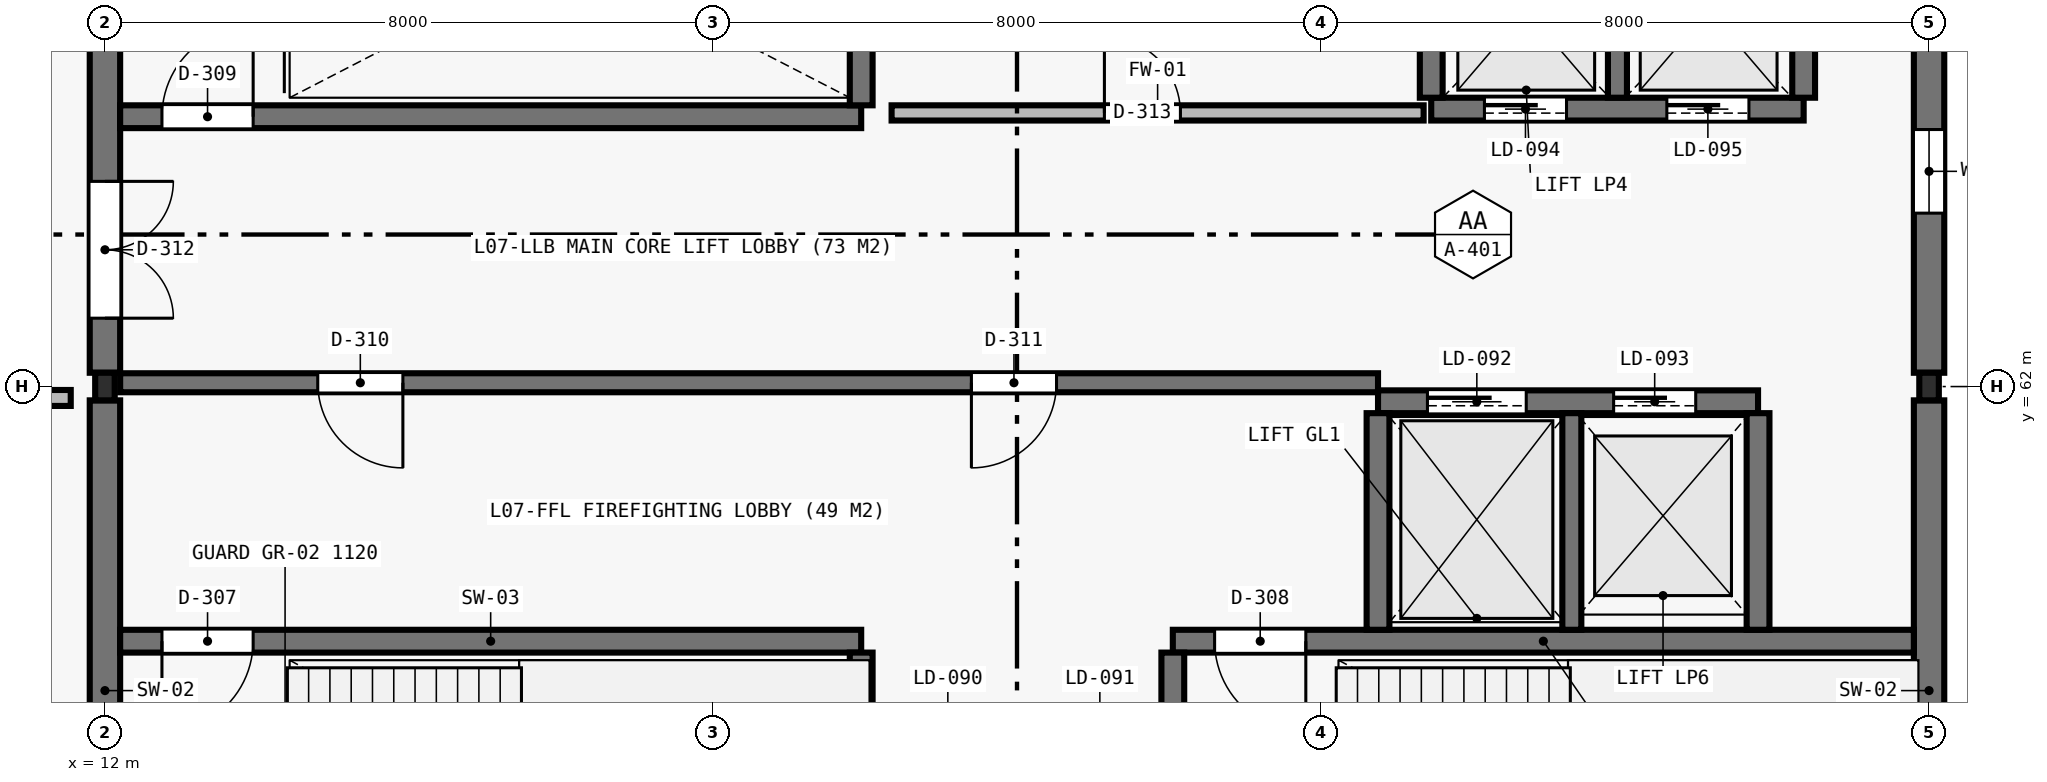
"""IFC4 building model, lengths in metres.
Left out: names, types, materials, properties, quantities, classifications, styles, units other than length and angle.
Written with IfcOpenShell. Run it as: python <this file> out.ifc"""

import sys

from ifc_helpers import new_model, si_unit, direction, frame, frame_2d, origin, origin_2d, place, context, subcontext, project, spatial, rectangle, i_section, extrude, element, fill, save


model = new_model("IFC4")
c1 = context("Model", 3, precision=1e-05, world=origin(), true_north=direction((0.0, 1.0)))
c2 = subcontext(c1, "Body", "Model", "MODEL_VIEW")
j1 = project(units=[si_unit("LENGTHUNIT", "METRE"), si_unit("PLANEANGLEUNIT", "RADIAN")], contexts=[c1])
p1 = place(None, origin())
s1 = spatial("IfcSite", under=j1, at=p1, CompositionType="ELEMENT")
p2 = place(p1, origin())
s2 = spatial("IfcBuilding", under=s1, at=p2, CompositionType="ELEMENT")
p3 = place(p2, frame((0.0, 0.0, 32.2)))
s3 = spatial("IfcBuildingStorey", under=s2, at=p3, CompositionType="ELEMENT", Elevation=32.2)
for number, where, z_axis, x_axis in (
    (1, (12.0, 62.0, 0.0), (0.0, 0.0, 1.0), (1.0, 0.0, 0.0)),
    (2, (36.0, 62.0, 0.0), (0.0, 0.0, 1.0), (1.0, 0.0, 0.0)),
):
    element("IfcColumn", number, at=place(p3, frame(where, z_axis=z_axis, x_axis=x_axis)), inside=s3, PredefinedType="COLUMN", context=c2, shape_type="SweptSolid", body=[
        extrude(i_section(OverallWidth=0.257, OverallDepth=0.363, WebThickness=0.013, FlangeThickness=0.022, at=origin_2d()), origin(), (0.0, 0.0, 1.0), 3.96),
    ])
p4 = place(p3, frame((12.0, 54.181, 0.0), z_axis=(0.0, 0.0, 1.0), x_axis=(0.0, 1.0, 0.0)))
e3 = element("IfcWall", 3, at=p4, inside=s3, PredefinedType="SHEAR", context=c2, shape_type="SweptSolid", body=[
    extrude(rectangle(XDim=7.637, YDim=0.4, at=frame_2d((3.819, 0.0))), origin(), (0.0, 0.0, 1.0), 3.96),
])
p5 = place(p3, frame((12.0, 62.181, 0.0), z_axis=(0.0, 0.0, 1.0), x_axis=(0.0, 1.0, 0.0)))
e4 = element("IfcWall", 4, at=p5, inside=s3, PredefinedType="SHEAR", context=c2, shape_type="SweptSolid", body=[
    extrude(rectangle(XDim=7.637, YDim=0.4, at=frame_2d((3.819, 0.0))), origin(), (0.0, 0.0, 1.0), 3.96),
])
p6 = place(p5, frame((0.718, 0.0, 0.0)))
e5 = element("IfcOpeningElement", 5, at=p6, cuts=e4, PredefinedType="OPENING", context=c2, shape_type="SweptSolid", body=[
    extrude(rectangle(XDim=1.8, YDim=2.2, at=frame_2d((0.9, 1.1))), frame((0.0, 0.21, 0.0), z_axis=(0.0, -1.0, 0.0), x_axis=(1.0, 0.0, 0.0)), (0.0, 0.0, 1.0), 0.42),
])
p7 = place(p3, frame((36.0, 54.181, 0.0), z_axis=(0.0, 0.0, 1.0), x_axis=(0.0, 1.0, 0.0)))
e6 = element("IfcWall", 6, at=p7, inside=s3, PredefinedType="SHEAR", context=c2, shape_type="SweptSolid", body=[
    extrude(rectangle(XDim=7.637, YDim=0.4, at=frame_2d((3.819, 0.0))), origin(), (0.0, 0.0, 1.0), 3.96),
])
p8 = place(p3, frame((36.0, 62.181, 0.0), z_axis=(0.0, 0.0, 1.0), x_axis=(0.0, 1.0, 0.0)))
e7 = element("IfcWall", 7, at=p8, inside=s3, PredefinedType="SHEAR", context=c2, shape_type="SweptSolid", body=[
    extrude(rectangle(XDim=7.637, YDim=0.4, at=frame_2d((3.819, 0.0))), origin(), (0.0, 0.0, 1.0), 3.96),
])
p9 = place(p8, frame((2.1, 0.0, 0.95)))
e8 = element("IfcOpeningElement", 8, at=p9, cuts=e7, PredefinedType="OPENING", context=c2, shape_type="SweptSolid", body=[
    extrude(rectangle(XDim=1.1, YDim=2.3, at=frame_2d((0.55, 1.15))), frame((0.0, 0.21, 0.0), z_axis=(0.0, -1.0, 0.0), x_axis=(1.0, 0.0, 0.0)), (0.0, 0.0, 1.0), 0.42),
])
p10 = place(p3, frame((12.2, 58.65, 0.0), z_axis=(0.0, 0.0, 1.0), x_axis=(1.0, 0.0, 0.0)))
e9 = element("IfcWall", 9, at=p10, inside=s3, PredefinedType="SHEAR", context=c2, shape_type="SweptSolid", body=[
    extrude(rectangle(XDim=9.75, YDim=0.3, at=frame_2d((4.875, 0.0))), origin(), (0.0, 0.0, 1.0), 3.96),
])
p11 = place(p10, frame((0.55, 0.0, 0.0)))
e10 = element("IfcOpeningElement", 10, at=p11, cuts=e9, PredefinedType="OPENING", context=c2, shape_type="SweptSolid", body=[
    extrude(rectangle(XDim=1.2, YDim=2.2, at=frame_2d((0.6, 1.1))), frame((0.0, 0.16, 0.0), z_axis=(0.0, -1.0, 0.0), x_axis=(1.0, 0.0, 0.0)), (0.0, 0.0, 1.0), 0.32),
])
p12 = place(p3, frame((21.95, 54.25, 0.0), z_axis=(0.0, 0.0, 1.0), x_axis=(0.0, 1.0, 0.0)))
e11 = element("IfcWall", 11, at=p12, inside=s3, PredefinedType="SHEAR", context=c2, shape_type="SweptSolid", body=[
    extrude(rectangle(XDim=4.25, YDim=0.3, at=frame_2d((2.125, 0.0))), origin(), (0.0, 0.0, 1.0), 3.96),
])
p13 = place(p3, frame((26.05, 58.65, 0.0), z_axis=(0.0, 0.0, 1.0), x_axis=(1.0, 0.0, 0.0)))
e12 = element("IfcWall", 12, at=p13, inside=s3, PredefinedType="SHEAR", context=c2, shape_type="SweptSolid", body=[
    extrude(rectangle(XDim=9.75, YDim=0.3, at=frame_2d((4.875, 0.0))), origin(), (0.0, 0.0, 1.0), 3.96),
])
p14 = place(p13, frame((0.55, 0.0, 0.0)))
e13 = element("IfcOpeningElement", 13, at=p14, cuts=e12, PredefinedType="OPENING", context=c2, shape_type="SweptSolid", body=[
    extrude(rectangle(XDim=1.2, YDim=2.2, at=frame_2d((0.6, 1.1))), frame((0.0, 0.16, 0.0), z_axis=(0.0, -1.0, 0.0), x_axis=(1.0, 0.0, 0.0)), (0.0, 0.0, 1.0), 0.32),
])
p15 = place(p3, frame((26.05, 54.25, 0.0), z_axis=(0.0, 0.0, 1.0), x_axis=(0.0, 1.0, 0.0)))
e14 = element("IfcWall", 14, at=p15, inside=s3, PredefinedType="SHEAR", context=c2, shape_type="SweptSolid", body=[
    extrude(rectangle(XDim=4.25, YDim=0.3, at=frame_2d((2.125, 0.0))), origin(), (0.0, 0.0, 1.0), 3.96),
])
p16 = place(p3, frame((28.75, 61.8, 0.0), z_axis=(0.0, 0.0, 1.0), x_axis=(1.0, 0.0, 0.0)))
e15 = element("IfcWall", 15, at=p16, inside=s3, PredefinedType="SHEAR", context=c2, shape_type="SweptSolid", body=[
    extrude(rectangle(XDim=5.0, YDim=0.3, at=frame_2d((2.5, 0.0))), origin(), (0.0, 0.0, 1.0), 3.96),
])
p17 = place(p16, frame((0.65, 0.0, 0.0)))
e16 = element("IfcOpeningElement", 16, at=p17, cuts=e15, PredefinedType="OPENING", context=c2, shape_type="SweptSolid", body=[
    extrude(rectangle(XDim=1.3, YDim=2.3, at=frame_2d((0.65, 1.15))), frame((0.0, 0.16, 0.0), z_axis=(0.0, -1.0, 0.0), x_axis=(1.0, 0.0, 0.0)), (0.0, 0.0, 1.0), 0.32),
])
p18 = place(p16, frame((3.1, 0.0, 0.0)))
e17 = element("IfcOpeningElement", 17, at=p18, cuts=e15, PredefinedType="OPENING", context=c2, shape_type="SweptSolid", body=[
    extrude(rectangle(XDim=1.08, YDim=2.2, at=frame_2d((0.54, 1.1))), frame((0.0, 0.16, 0.0), z_axis=(0.0, -1.0, 0.0), x_axis=(1.0, 0.0, 0.0)), (0.0, 0.0, 1.0), 0.32),
])
for number, where, z_axis, x_axis in (
    (18, (28.75, 58.8, 0.0), (0.0, 0.0, 1.0), (0.0, 1.0, 0.0)),
    (19, (33.75, 58.8, 0.0), (0.0, 0.0, 1.0), (0.0, 1.0, 0.0)),
):
    element("IfcWall", number, at=place(p3, frame(where, z_axis=z_axis, x_axis=x_axis)), inside=s3, PredefinedType="SHEAR", context=c2, shape_type="SweptSolid", body=[
        extrude(rectangle(XDim=2.85, YDim=0.3, at=frame_2d((1.425, 0.0))), origin(), (0.0, 0.0, 1.0), 3.96),
    ])
p19 = place(p3, frame((31.3, 58.8, 0.0), z_axis=(0.0, 0.0, 1.0), x_axis=(0.0, 1.0, 0.0)))
e20 = element("IfcWall", 20, at=p19, inside=s3, PredefinedType="SHEAR", context=c2, shape_type="SweptSolid", body=[
    extrude(rectangle(XDim=2.85, YDim=0.25, at=frame_2d((1.425, 0.0))), origin(), (0.0, 0.0, 1.0), 3.96),
])
p20 = place(p3, frame((12.2, 62.05, 0.0), z_axis=(0.0, 0.0, 1.0), x_axis=(1.0, 0.0, 0.0)))
e21 = element("IfcWall", 21, at=p20, inside=s3, PredefinedType="SHEAR", context=c2, shape_type="SweptSolid", body=[
    extrude(rectangle(XDim=16.55, YDim=0.25, at=frame_2d((8.275, 0.0))), origin(), (0.0, 0.0, 1.0), 3.96),
])
p21 = place(p20, frame((2.6, 0.0, 0.0)))
e22 = element("IfcOpeningElement", 22, at=p21, cuts=e21, PredefinedType="OPENING", context=c2, shape_type="SweptSolid", body=[
    extrude(rectangle(XDim=1.12, YDim=2.22, at=frame_2d((0.56, 1.11))), frame((0.0, 0.135, 0.0), z_axis=(0.0, -1.0, 0.0), x_axis=(1.0, 0.0, 0.0)), (0.0, 0.0, 1.0), 0.27),
])
p22 = place(p20, frame((11.2, 0.0, 0.0)))
e23 = element("IfcOpeningElement", 23, at=p22, cuts=e21, PredefinedType="OPENING", context=c2, shape_type="SweptSolid", body=[
    extrude(rectangle(XDim=1.12, YDim=2.22, at=frame_2d((0.56, 1.11))), frame((0.0, 0.135, 0.0), z_axis=(0.0, -1.0, 0.0), x_axis=(1.0, 0.0, 0.0)), (0.0, 0.0, 1.0), 0.27),
])
p23 = place(p3, frame((12.2, 65.55, 0.0), z_axis=(0.0, 0.0, 1.0), x_axis=(1.0, 0.0, 0.0)))
e24 = element("IfcWall", 24, at=p23, inside=s3, PredefinedType="SHEAR", context=c2, shape_type="SweptSolid", body=[
    extrude(rectangle(XDim=9.75, YDim=0.3, at=frame_2d((4.875, 0.0))), origin(), (0.0, 0.0, 1.0), 3.96),
])
p24 = place(p23, frame((0.55, 0.0, 0.0)))
e25 = element("IfcOpeningElement", 25, at=p24, cuts=e24, PredefinedType="OPENING", context=c2, shape_type="SweptSolid", body=[
    extrude(rectangle(XDim=1.2, YDim=2.2, at=frame_2d((0.6, 1.1))), frame((0.0, 0.16, 0.0), z_axis=(0.0, -1.0, 0.0), x_axis=(1.0, 0.0, 0.0)), (0.0, 0.0, 1.0), 0.32),
])
p25 = place(p3, frame((21.95, 65.7, 0.0), z_axis=(0.0, 0.0, 1.0), x_axis=(0.0, 1.0, 0.0)))
e26 = element("IfcWall", 26, at=p25, inside=s3, PredefinedType="SHEAR", context=c2, shape_type="SweptSolid", body=[
    extrude(rectangle(XDim=4.05, YDim=0.3, at=frame_2d((2.025, 0.0))), origin(), (0.0, 0.0, 1.0), 3.96),
])
p26 = place(p3, frame((29.45, 65.65, 0.0), z_axis=(0.0, 0.0, 1.0), x_axis=(1.0, 0.0, 0.0)))
e27 = element("IfcWall", 27, at=p26, inside=s3, PredefinedType="SHEAR", context=c2, shape_type="SweptSolid", body=[
    extrude(rectangle(XDim=4.9, YDim=0.3, at=frame_2d((2.45, 0.0))), origin(), (0.0, 0.0, 1.0), 3.96),
])
p27 = place(p26, frame((0.7, 0.0, 0.0)))
e28 = element("IfcOpeningElement", 28, at=p27, cuts=e27, PredefinedType="OPENING", context=c2, shape_type="SweptSolid", body=[
    extrude(rectangle(XDim=1.08, YDim=2.2, at=frame_2d((0.54, 1.1))), frame((0.0, 0.16, 0.0), z_axis=(0.0, -1.0, 0.0), x_axis=(1.0, 0.0, 0.0)), (0.0, 0.0, 1.0), 0.32),
])
p28 = place(p26, frame((3.1, 0.0, 0.0)))
e29 = element("IfcOpeningElement", 29, at=p28, cuts=e27, PredefinedType="OPENING", context=c2, shape_type="SweptSolid", body=[
    extrude(rectangle(XDim=1.08, YDim=2.2, at=frame_2d((0.54, 1.1))), frame((0.0, 0.16, 0.0), z_axis=(0.0, -1.0, 0.0), x_axis=(1.0, 0.0, 0.0)), (0.0, 0.0, 1.0), 0.32),
])
for number, where, z_axis, x_axis in (
    (30, (29.45, 65.8, 0.0), (0.0, 0.0, 1.0), (0.0, 1.0, 0.0)),
    (31, (34.35, 65.8, 0.0), (0.0, 0.0, 1.0), (0.0, 1.0, 0.0)),
):
    element("IfcWall", number, at=place(p3, frame(where, z_axis=z_axis, x_axis=x_axis)), inside=s3, PredefinedType="SHEAR", context=c2, shape_type="SweptSolid", body=[
        extrude(rectangle(XDim=2.3, YDim=0.3, at=frame_2d((1.15, 0.0))), origin(), (0.0, 0.0, 1.0), 3.96),
    ])
p29 = place(p3, frame((31.9, 65.8, 0.0), z_axis=(0.0, 0.0, 1.0), x_axis=(0.0, 1.0, 0.0)))
e32 = element("IfcWall", 32, at=p29, inside=s3, PredefinedType="SHEAR", context=c2, shape_type="SweptSolid", body=[
    extrude(rectangle(XDim=2.3, YDim=0.25, at=frame_2d((1.15, 0.0))), origin(), (0.0, 0.0, 1.0), 3.96),
])
p30 = place(p3, frame((22.35, 65.6, 0.0), z_axis=(0.0, 0.0, 1.0), x_axis=(1.0, 0.0, 0.0)))
e33 = element("IfcWall", 33, at=p30, inside=s3, PredefinedType="SOLIDWALL", context=c2, shape_type="SweptSolid", body=[
    extrude(rectangle(XDim=7.0, YDim=0.2, at=frame_2d((3.5, 0.0))), origin(), (0.0, 0.0, 1.0), 3.96),
])
p31 = place(p30, frame((2.8, 0.0, 0.0)))
e34 = element("IfcOpeningElement", 34, at=p31, cuts=e33, PredefinedType="OPENING", context=c2, shape_type="SweptSolid", body=[
    extrude(rectangle(XDim=1.0, YDim=2.15, at=frame_2d((0.5, 1.075))), frame((0.0, 0.11, 0.0), z_axis=(0.0, -1.0, 0.0), x_axis=(1.0, 0.0, 0.0)), (0.0, 0.0, 1.0), 0.22),
])
p32 = place(p3, frame((6.35, 61.85, 0.0), z_axis=(0.0, 0.0, 1.0), x_axis=(1.0, 0.0, 0.0)))
e35 = element("IfcWall", 35, at=p32, inside=s3, PredefinedType="PLUMBINGWALL", context=c2, shape_type="SweptSolid", body=[
    extrude(rectangle(XDim=5.2, YDim=0.21, at=frame_2d((2.6, 0.0))), origin(), (0.0, 0.0, 1.0), 3.96),
])
p33 = place(p32, frame((0.35, 0.0, 0.0)))
e36 = element("IfcOpeningElement", 36, at=p33, cuts=e35, PredefinedType="OPENING", context=c2, shape_type="SweptSolid", body=[
    extrude(rectangle(XDim=0.95, YDim=2.1, at=frame_2d((0.475, 1.05))), frame((0.0, 0.115, 0.0), z_axis=(0.0, -1.0, 0.0), x_axis=(1.0, 0.0, 0.0)), (0.0, 0.0, 1.0), 0.23),
])
p34 = place(p32, frame((2.1, 0.0, 0.0)))
e37 = element("IfcOpeningElement", 37, at=p34, cuts=e35, PredefinedType="OPENING", context=c2, shape_type="SweptSolid", body=[
    extrude(rectangle(XDim=0.9, YDim=2.1, at=frame_2d((0.45, 1.05))), frame((0.0, 0.115, 0.0), z_axis=(0.0, -1.0, 0.0), x_axis=(1.0, 0.0, 0.0)), (0.0, 0.0, 1.0), 0.23),
])
p35 = place(p32, frame((3.8, 0.0, 0.0)))
e38 = element("IfcOpeningElement", 38, at=p35, cuts=e35, PredefinedType="OPENING", context=c2, shape_type="SweptSolid", body=[
    extrude(rectangle(XDim=0.9, YDim=2.1, at=frame_2d((0.45, 1.05))), frame((0.0, 0.115, 0.0), z_axis=(0.0, -1.0, 0.0), x_axis=(1.0, 0.0, 0.0)), (0.0, 0.0, 1.0), 0.23),
])
p36 = place(p9, origin())
e39 = element("IfcWindow", 39, at=p36, inside=s3, PartitioningType="SINGLE_PANEL", PredefinedType="WINDOW", context=c2, shape_type="SweptSolid", body=[
    extrude(rectangle(XDim=1.1, YDim=2.3, at=frame_2d((0.55, 1.15))), frame((0.0, 0.03, 0.0), z_axis=(0.0, -1.0, 0.0), x_axis=(1.0, 0.0, 0.0)), (0.0, 0.0, 1.0), 0.06),
])
fill(e8, e39)
p37 = place(p11, frame((1.2, 0.0, 0.0), z_axis=(0.0, 0.0, 1.0), x_axis=(-1.0, 0.0, 0.0)))
e40 = element("IfcDoor", 40, at=p37, inside=s3, OperationType="SINGLE_SWING_RIGHT", PredefinedType="DOOR", context=c2, shape_type="SweptSolid", body=[
    extrude(rectangle(XDim=1.2, YDim=2.2, at=frame_2d((0.6, 1.1))), frame((0.0, 0.025, 0.0), z_axis=(0.0, -1.0, 0.0), x_axis=(1.0, 0.0, 0.0)), (0.0, 0.0, 1.0), 0.05),
])
fill(e10, e40)
p38 = place(p14, frame((1.2, 0.0, 0.0), z_axis=(0.0, 0.0, 1.0), x_axis=(-1.0, 0.0, 0.0)))
e41 = element("IfcDoor", 41, at=p38, inside=s3, OperationType="SINGLE_SWING_LEFT", PredefinedType="DOOR", context=c2, shape_type="SweptSolid", body=[
    extrude(rectangle(XDim=1.2, YDim=2.2, at=frame_2d((0.6, 1.1))), frame((0.0, 0.025, 0.0), z_axis=(0.0, -1.0, 0.0), x_axis=(1.0, 0.0, 0.0)), (0.0, 0.0, 1.0), 0.05),
])
fill(e13, e41)
p39 = place(p24, origin())
e42 = element("IfcDoor", 42, at=p39, inside=s3, OperationType="SINGLE_SWING_RIGHT", PredefinedType="DOOR", context=c2, shape_type="SweptSolid", body=[
    extrude(rectangle(XDim=1.2, YDim=2.2, at=frame_2d((0.6, 1.1))), frame((0.0, 0.025, 0.0), z_axis=(0.0, -1.0, 0.0), x_axis=(1.0, 0.0, 0.0)), (0.0, 0.0, 1.0), 0.05),
])
fill(e25, e42)
p40 = place(p17, origin())
e43 = element("IfcDoor", 43, at=p40, inside=s3, OperationType="SLIDING_TO_LEFT", PredefinedType="DOOR", context=c2, shape_type="SweptSolid", body=[
    extrude(rectangle(XDim=1.3, YDim=2.3, at=frame_2d((0.65, 1.15))), frame((0.0, 0.025, 0.0), z_axis=(0.0, -1.0, 0.0), x_axis=(1.0, 0.0, 0.0)), (0.0, 0.0, 1.0), 0.05),
])
fill(e16, e43)
p41 = place(p18, origin())
e44 = element("IfcDoor", 44, at=p41, inside=s3, OperationType="SLIDING_TO_LEFT", PredefinedType="DOOR", context=c2, shape_type="SweptSolid", body=[
    extrude(rectangle(XDim=1.08, YDim=2.2, at=frame_2d((0.54, 1.1))), frame((0.0, 0.025, 0.0), z_axis=(0.0, -1.0, 0.0), x_axis=(1.0, 0.0, 0.0)), (0.0, 0.0, 1.0), 0.05),
])
fill(e17, e44)
p42 = place(p27, origin())
e45 = element("IfcDoor", 45, at=p42, inside=s3, OperationType="SLIDING_TO_LEFT", PredefinedType="DOOR", context=c2, shape_type="SweptSolid", body=[
    extrude(rectangle(XDim=1.08, YDim=2.2, at=frame_2d((0.54, 1.1))), frame((0.0, 0.025, 0.0), z_axis=(0.0, -1.0, 0.0), x_axis=(1.0, 0.0, 0.0)), (0.0, 0.0, 1.0), 0.05),
])
fill(e28, e45)
p43 = place(p28, origin())
e46 = element("IfcDoor", 46, at=p43, inside=s3, OperationType="SLIDING_TO_LEFT", PredefinedType="DOOR", context=c2, shape_type="SweptSolid", body=[
    extrude(rectangle(XDim=1.08, YDim=2.2, at=frame_2d((0.54, 1.1))), frame((0.0, 0.025, 0.0), z_axis=(0.0, -1.0, 0.0), x_axis=(1.0, 0.0, 0.0)), (0.0, 0.0, 1.0), 0.05),
])
fill(e29, e46)
p44 = place(p21, frame((1.12, 0.0, 0.0), z_axis=(0.0, 0.0, 1.0), x_axis=(-1.0, 0.0, 0.0)))
e47 = element("IfcDoor", 47, at=p44, inside=s3, OperationType="SINGLE_SWING_LEFT", PredefinedType="DOOR", context=c2, shape_type="SweptSolid", body=[
    extrude(rectangle(XDim=1.12, YDim=2.22, at=frame_2d((0.56, 1.11))), frame((0.0, 0.025, 0.0), z_axis=(0.0, -1.0, 0.0), x_axis=(1.0, 0.0, 0.0)), (0.0, 0.0, 1.0), 0.05),
])
fill(e22, e47)
p45 = place(p22, frame((1.12, 0.0, 0.0), z_axis=(0.0, 0.0, 1.0), x_axis=(-1.0, 0.0, 0.0)))
e48 = element("IfcDoor", 48, at=p45, inside=s3, OperationType="SINGLE_SWING_RIGHT", PredefinedType="DOOR", context=c2, shape_type="SweptSolid", body=[
    extrude(rectangle(XDim=1.12, YDim=2.22, at=frame_2d((0.56, 1.11))), frame((0.0, 0.025, 0.0), z_axis=(0.0, -1.0, 0.0), x_axis=(1.0, 0.0, 0.0)), (0.0, 0.0, 1.0), 0.05),
])
fill(e23, e48)
p46 = place(p6, frame((1.8, 0.0, 0.0), z_axis=(0.0, 0.0, 1.0), x_axis=(-1.0, 0.0, 0.0)))
e49 = element("IfcDoor", 49, at=p46, inside=s3, OperationType="DOUBLE_DOOR_SINGLE_SWING", PredefinedType="DOOR", context=c2, shape_type="SweptSolid", body=[
    extrude(rectangle(XDim=1.8, YDim=2.2, at=frame_2d((0.9, 1.1))), frame((0.0, 0.025, 0.0), z_axis=(0.0, -1.0, 0.0), x_axis=(1.0, 0.0, 0.0)), (0.0, 0.0, 1.0), 0.05),
])
fill(e5, e49)
p47 = place(p31, origin())
e50 = element("IfcDoor", 50, at=p47, inside=s3, OperationType="SINGLE_SWING_LEFT", PredefinedType="DOOR", context=c2, shape_type="SweptSolid", body=[
    extrude(rectangle(XDim=1.0, YDim=2.15, at=frame_2d((0.5, 1.075))), frame((0.0, 0.025, 0.0), z_axis=(0.0, -1.0, 0.0), x_axis=(1.0, 0.0, 0.0)), (0.0, 0.0, 1.0), 0.05),
])
fill(e34, e50)
save(model, sys.argv[1])
